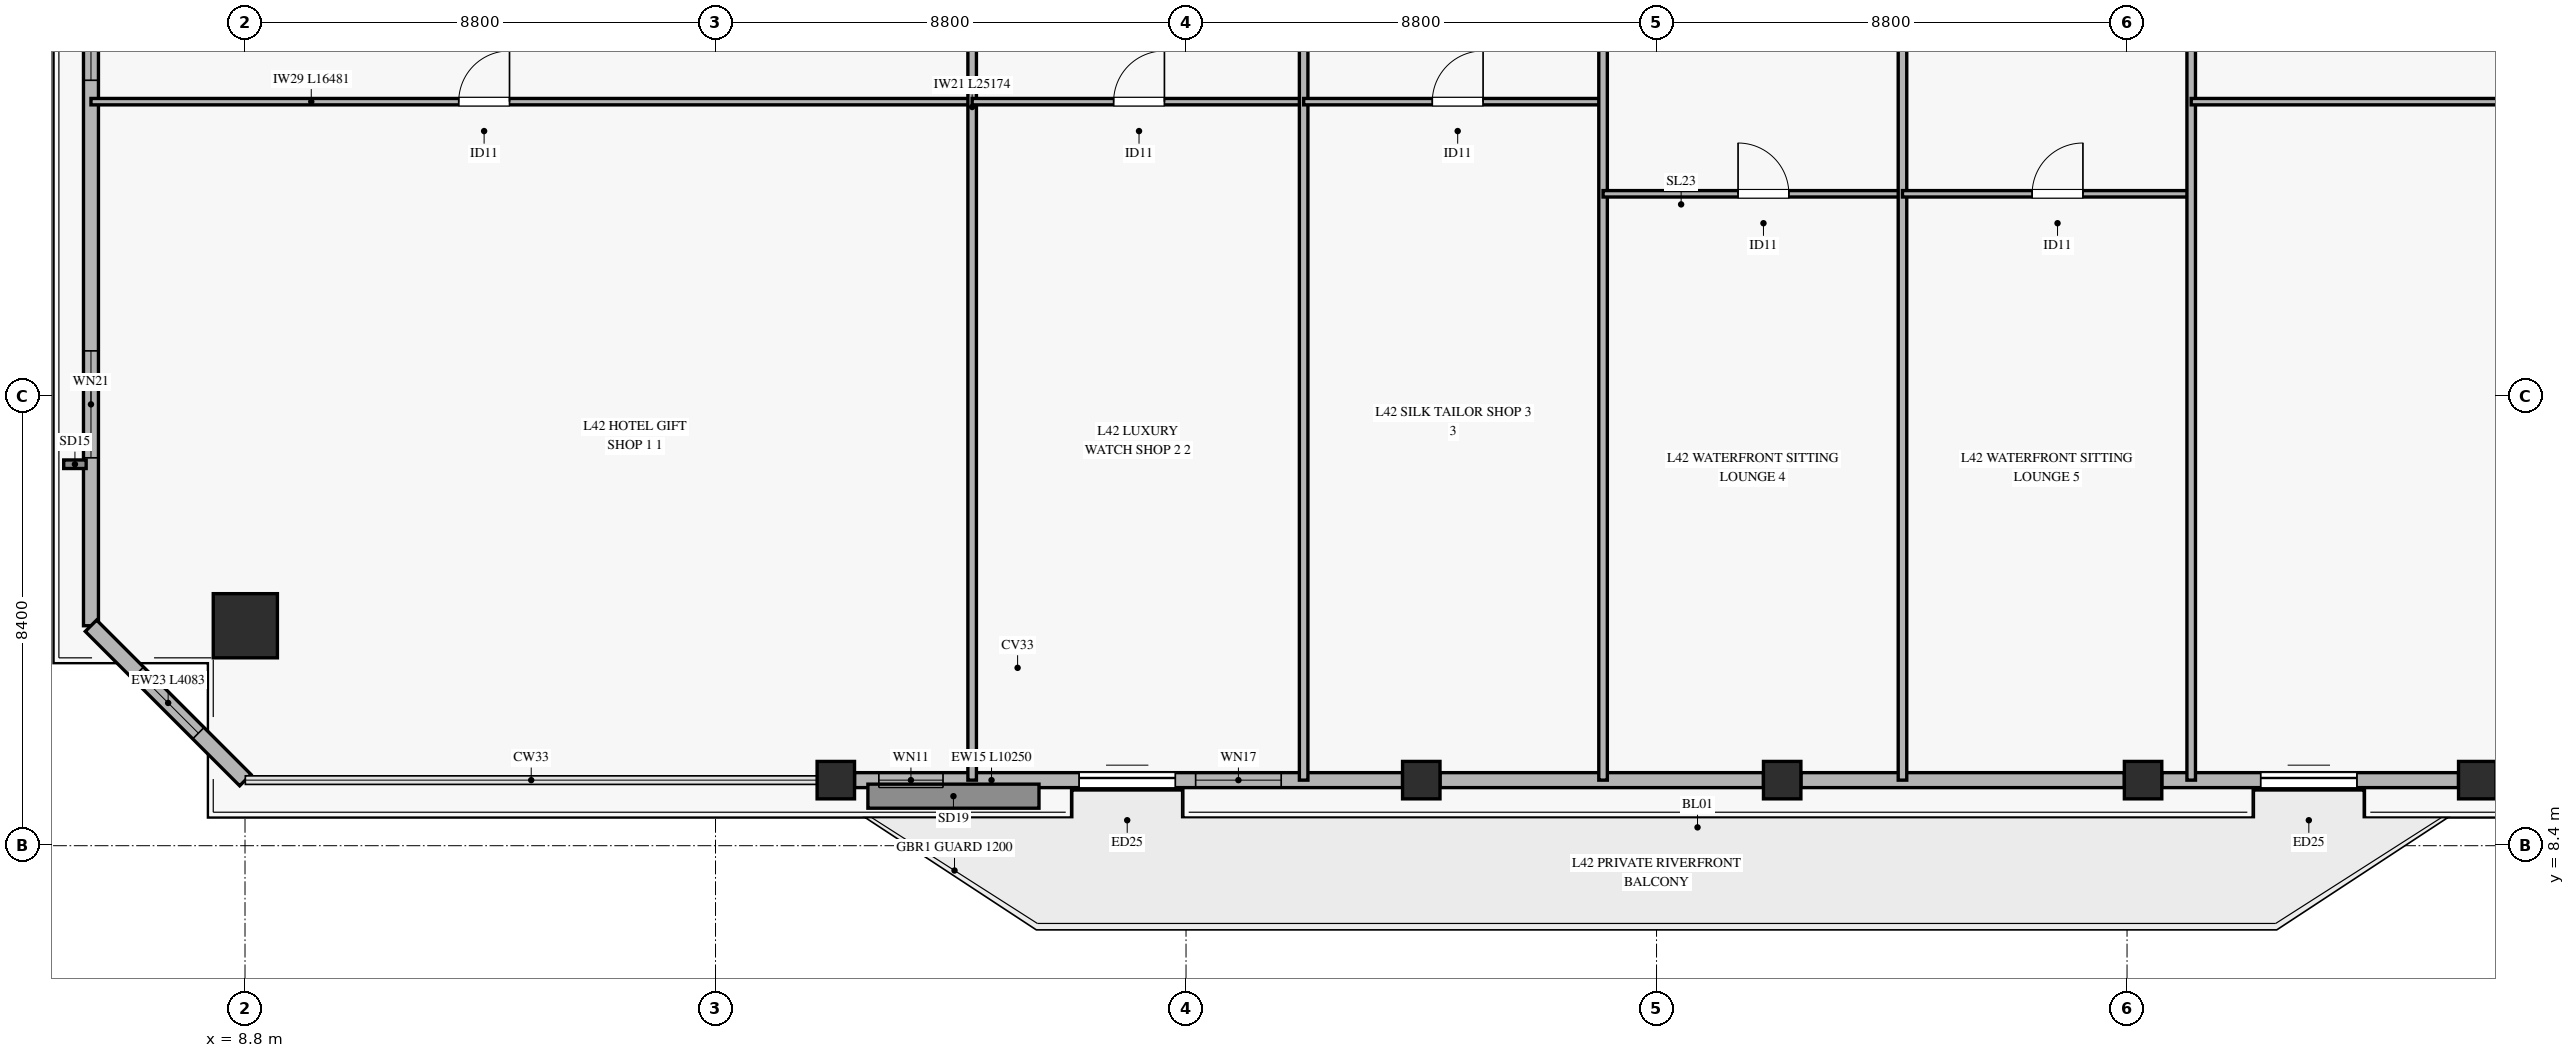
"""IFC4 building model, lengths in metres.
Left out: names, types, materials, properties, quantities, classifications, styles, units other than length and angle.
Written with IfcOpenShell. Run it as: python <this file> out.ifc"""

import sys

from ifc_helpers import new_model, si_unit, direction, frame, frame_2d, origin, origin_2d, place, context, subcontext, project, spatial, rectangle, hollow_rectangle, extrude, source, transform, mapped, element, fill, save


model = new_model("IFC4")
c1 = context("Model", 3, precision=1e-05, world=origin(), true_north=direction((0.0, 1.0)))
c2 = subcontext(c1, "Body", "Model", "MODEL_VIEW")
j1 = project(units=[si_unit("LENGTHUNIT", "METRE"), si_unit("PLANEANGLEUNIT", "RADIAN")], contexts=[c1])
p1 = place(None, origin())
s1 = spatial("IfcSite", under=j1, at=p1, CompositionType="ELEMENT")
p2 = place(p1, origin())
s2 = spatial("IfcBuilding", under=s1, at=p2, CompositionType="ELEMENT")
p3 = place(p2, frame((0.0, 0.0, 170.2)))
s3 = spatial("IfcBuildingStorey", under=s2, at=p3, CompositionType="ELEMENT", Elevation=170.2)
m1 = source(origin(), c2, "Body", "SweptSolid", [
    extrude(hollow_rectangle(XDim=1.2, YDim=1.2, WallThickness=0.055, at=origin_2d()), origin(), (0.0, 0.0, 1.0), 3.27),
])
p4 = place(p3, frame((8.806, 12.513, 0.0), z_axis=(0.0, 0.0, 1.0), x_axis=(1.0, 0.0, 0.0)))
e1 = element("IfcColumn", 1, at=p4, inside=s3, PredefinedType="COLUMN", context=c2, shape_type="MappedRepresentation", body=[
    mapped(m1, transform((0.0, 0.0, 0.0), x_axis=(1.0, 0.0, 0.0), y_axis=(0.0, 1.0, 0.0), z_axis=(0.0, 0.0, 1.0), scale=1.0)),
])
m2 = source(origin(), c2, "Body", "SweptSolid", [
    extrude(hollow_rectangle(XDim=0.7, YDim=0.7, WallThickness=0.032, at=origin_2d()), origin(), (0.0, 0.0, 1.0), 3.27),
])
for number, where, z_axis, x_axis in (
    (2, (19.85, 9.626, 0.0), (0.0, 0.0, 1.0), (1.0, 0.0, 0.0)),
    (3, (30.8, 9.626, 0.0), (0.0, 0.0, 1.0), (1.0, 0.0, 0.0)),
    (4, (37.55, 9.626, 0.0), (0.0, 0.0, 1.0), (1.0, 0.0, 0.0)),
    (5, (44.3, 9.626, 0.0), (0.0, 0.0, 1.0), (1.0, 0.0, 0.0)),
    (6, (50.55, 9.626, 0.0), (0.0, 0.0, 1.0), (1.0, 0.0, 0.0)),
):
    element("IfcColumn", number, at=place(p3, frame(where, z_axis=z_axis, x_axis=x_axis)), inside=s3, PredefinedType="COLUMN", context=c2, shape_type="MappedRepresentation", body=[
        mapped(m2, transform((0.0, 0.0, 0.0), x_axis=(1.0, 0.0, 0.0), y_axis=(0.0, 1.0, 0.0), z_axis=(0.0, 0.0, 1.0), scale=1.0)),
    ])
p5 = place(p3, frame((20.2, 9.626, 0.0), z_axis=(0.0, 0.0, 1.0), x_axis=(1.0, 0.0, 0.0)))
e7 = element("IfcWall", 7, at=p5, inside=s3, PredefinedType="SOLIDWALL", context=c2, shape_type="SweptSolid", body=[
    extrude(rectangle(XDim=10.25, YDim=0.28, at=frame_2d((5.125, 0.0))), origin(), (0.0, 0.0, 1.0), 2.75),
])
p6 = place(p5, frame((4.2, 0.0, 0.0)))
e8 = element("IfcOpeningElement", 8, at=p6, cuts=e7, PredefinedType="OPENING", context=c2, shape_type="SweptSolid", body=[
    extrude(rectangle(XDim=1.8, YDim=2.25, at=frame_2d((0.9, 1.125))), frame((0.0, 0.15, 0.0), z_axis=(0.0, -1.0, 0.0), x_axis=(1.0, 0.0, 0.0)), (0.0, 0.0, 1.0), 0.3),
])
p7 = place(p5, frame((0.455, 0.0, 0.45)))
e9 = element("IfcOpeningElement", 9, at=p7, cuts=e7, PredefinedType="OPENING", context=c2, shape_type="SweptSolid", body=[
    extrude(rectangle(XDim=1.2, YDim=2.0, at=frame_2d((0.6, 1.0))), frame((0.0, 0.15, 0.0), z_axis=(0.0, -1.0, 0.0), x_axis=(1.0, 0.0, 0.0)), (0.0, 0.0, 1.0), 0.3),
])
p8 = place(p5, frame((6.38, 0.0, 0.45)))
e10 = element("IfcOpeningElement", 10, at=p8, cuts=e7, PredefinedType="OPENING", context=c2, shape_type="SweptSolid", body=[
    extrude(rectangle(XDim=1.6, YDim=2.0, at=frame_2d((0.8, 1.0))), frame((0.0, 0.15, 0.0), z_axis=(0.0, -1.0, 0.0), x_axis=(1.0, 0.0, 0.0)), (0.0, 0.0, 1.0), 0.3),
])
for number, where, z_axis, x_axis in (
    (11, (31.15, 9.626, 0.0), (0.0, 0.0, 1.0), (1.0, 0.0, 0.0)),
    (12, (37.9, 9.626, 0.0), (0.0, 0.0, 1.0), (1.0, 0.0, 0.0)),
):
    element("IfcWall", number, at=place(p3, frame(where, z_axis=z_axis, x_axis=x_axis)), inside=s3, PredefinedType="SOLIDWALL", context=c2, shape_type="SweptSolid", body=[
        extrude(rectangle(XDim=6.05, YDim=0.28, at=frame_2d((3.025, 0.0))), origin(), (0.0, 0.0, 1.0), 2.75),
    ])
p9 = place(p3, frame((44.65, 9.626, 0.0), z_axis=(0.0, 0.0, 1.0), x_axis=(1.0, 0.0, 0.0)))
e13 = element("IfcWall", 13, at=p9, inside=s3, PredefinedType="SOLIDWALL", context=c2, shape_type="SweptSolid", body=[
    extrude(rectangle(XDim=5.55, YDim=0.28, at=frame_2d((2.775, 0.0))), origin(), (0.0, 0.0, 1.0), 2.75),
])
p10 = place(p9, frame((1.85, 0.0, 0.0)))
e14 = element("IfcOpeningElement", 14, at=p10, cuts=e13, PredefinedType="OPENING", context=c2, shape_type="SweptSolid", body=[
    extrude(rectangle(XDim=1.8, YDim=2.25, at=frame_2d((0.9, 1.125))), frame((0.0, 0.15, 0.0), z_axis=(0.0, -1.0, 0.0), x_axis=(1.0, 0.0, 0.0)), (0.0, 0.0, 1.0), 0.3),
])
p11 = place(p3, frame((5.919, 12.513, 0.0), z_axis=(0.0, 0.0, 1.0), x_axis=(0.0, 1.0, 0.0)))
e15 = element("IfcWall", 15, at=p11, inside=s3, PredefinedType="SOLIDWALL", context=c2, shape_type="SweptSolid", body=[
    extrude(rectangle(XDim=15.0, YDim=0.28, at=frame_2d((7.5, 0.0))), origin(), (0.0, 0.0, 1.0), 2.75),
])
p12 = place(p11, frame((3.14, 0.0, 0.45)))
e16 = element("IfcOpeningElement", 16, at=p12, cuts=e15, PredefinedType="OPENING", context=c2, shape_type="SweptSolid", body=[
    extrude(rectangle(XDim=2.0, YDim=2.0, at=frame_2d((1.0, 1.0))), frame((0.0, 0.15, 0.0), z_axis=(0.0, -1.0, 0.0), x_axis=(1.0, 0.0, 0.0)), (0.0, 0.0, 1.0), 0.3),
])
p13 = place(p11, frame((10.2, 0.0, 0.45)))
e17 = element("IfcOpeningElement", 17, at=p13, cuts=e15, PredefinedType="OPENING", context=c2, shape_type="SweptSolid", body=[
    extrude(rectangle(XDim=2.0, YDim=2.0, at=frame_2d((1.0, 1.0))), frame((0.0, 0.15, 0.0), z_axis=(0.0, -1.0, 0.0), x_axis=(1.0, 0.0, 0.0)), (0.0, 0.0, 1.0), 0.3),
])
p14 = place(p3, frame((5.919, 12.513, 0.0), z_axis=(0.0, 0.0, 1.0), x_axis=(0.707106781187, -0.707106781187, 0.0)))
e18 = element("IfcWall", 18, at=p14, inside=s3, PredefinedType="SOLIDWALL", context=c2, shape_type="SweptSolid", body=[
    extrude(rectangle(XDim=4.083, YDim=0.3, at=frame_2d((2.042, 0.0))), origin(), (0.0, 0.0, 1.0), 2.75),
])
p15 = place(p14, frame((1.241, 0.0, 0.45)))
e19 = element("IfcOpeningElement", 19, at=p15, cuts=e18, PredefinedType="OPENING", context=c2, shape_type="SweptSolid", body=[
    extrude(rectangle(XDim=1.6, YDim=2.0, at=frame_2d((0.8, 1.0))), frame((0.0, 0.16, 0.0), z_axis=(0.0, -1.0, 0.0), x_axis=(1.0, 0.0, 0.0)), (0.0, 0.0, 1.0), 0.32),
])
p16 = place(p3, frame((5.919, 22.313, 0.0), z_axis=(0.0, 0.0, 1.0), x_axis=(1.0, 0.0, 0.0)))
e20 = element("IfcWall", 20, at=p16, inside=s3, PredefinedType="PARTITIONING", context=c2, shape_type="SweptSolid", body=[
    extrude(rectangle(XDim=16.481, YDim=0.12, at=frame_2d((8.24, 0.0))), origin(), (0.0, 0.0, 1.0), 2.455),
])
p17 = place(p16, frame((6.878, 0.0, 0.0)))
e21 = element("IfcOpeningElement", 21, at=p17, cuts=e20, PredefinedType="OPENING", context=c2, shape_type="SweptSolid", body=[
    extrude(rectangle(XDim=0.95, YDim=2.1, at=frame_2d((0.475, 1.05))), frame((0.0, 0.07, 0.0), z_axis=(0.0, -1.0, 0.0), x_axis=(1.0, 0.0, 0.0)), (0.0, 0.0, 1.0), 0.14),
])
p18 = place(p3, frame((22.4, 9.626, 0.0), z_axis=(0.0, 0.0, 1.0), x_axis=(0.0, 1.0, 0.0)))
e22 = element("IfcWall", 22, at=p18, inside=s3, PredefinedType="PARTITIONING", context=c2, shape_type="SweptSolid", body=[
    extrude(rectangle(XDim=25.174, YDim=0.16, at=frame_2d((12.587, 0.0))), origin(), (0.0, 0.0, 1.0), 2.755),
])
p19 = place(p3, frame((22.4, 22.313, 0.0), z_axis=(0.0, 0.0, 1.0), x_axis=(1.0, 0.0, 0.0)))
e23 = element("IfcWall", 23, at=p19, inside=s3, PredefinedType="PARTITIONING", context=c2, shape_type="SweptSolid", body=[
    extrude(rectangle(XDim=6.2, YDim=0.12, at=frame_2d((3.1, 0.0))), origin(), (0.0, 0.0, 1.0), 3.27),
])
p20 = place(p19, frame((2.646, 0.0, 0.0)))
e24 = element("IfcOpeningElement", 24, at=p20, cuts=e23, PredefinedType="OPENING", context=c2, shape_type="SweptSolid", body=[
    extrude(rectangle(XDim=0.95, YDim=2.1, at=frame_2d((0.475, 1.05))), frame((0.0, 0.07, 0.0), z_axis=(0.0, -1.0, 0.0), x_axis=(1.0, 0.0, 0.0)), (0.0, 0.0, 1.0), 0.14),
])
p21 = place(p3, frame((28.6, 9.626, 0.0), z_axis=(0.0, 0.0, 1.0), x_axis=(0.0, 1.0, 0.0)))
e25 = element("IfcWall", 25, at=p21, inside=s3, PredefinedType="PARTITIONING", context=c2, shape_type="SweptSolid", body=[
    extrude(rectangle(XDim=25.174, YDim=0.16, at=frame_2d((12.587, 0.0))), origin(), (0.0, 0.0, 1.0), 2.755),
])
p22 = place(p3, frame((28.6, 22.313, 0.0), z_axis=(0.0, 0.0, 1.0), x_axis=(1.0, 0.0, 0.0)))
e26 = element("IfcWall", 26, at=p22, inside=s3, PredefinedType="PARTITIONING", context=c2, shape_type="SweptSolid", body=[
    extrude(rectangle(XDim=5.6, YDim=0.12, at=frame_2d((2.8, 0.0))), origin(), (0.0, 0.0, 1.0), 2.455),
])
p23 = place(p22, frame((2.406, 0.0, 0.0)))
e27 = element("IfcOpeningElement", 27, at=p23, cuts=e26, PredefinedType="OPENING", context=c2, shape_type="SweptSolid", body=[
    extrude(rectangle(XDim=0.95, YDim=2.1, at=frame_2d((0.475, 1.05))), frame((0.0, 0.07, 0.0), z_axis=(0.0, -1.0, 0.0), x_axis=(1.0, 0.0, 0.0)), (0.0, 0.0, 1.0), 0.14),
])
p24 = place(p3, frame((34.2, 9.626, 0.0), z_axis=(0.0, 0.0, 1.0), x_axis=(0.0, 1.0, 0.0)))
e28 = element("IfcWall", 28, at=p24, inside=s3, PredefinedType="PARTITIONING", context=c2, shape_type="SweptSolid", body=[
    extrude(rectangle(XDim=25.174, YDim=0.16, at=frame_2d((12.587, 0.0))), origin(), (0.0, 0.0, 1.0), 2.755),
])
p25 = place(p3, frame((34.2, 20.59, 0.0), z_axis=(0.0, 0.0, 1.0), x_axis=(1.0, 0.0, 0.0)))
e29 = element("IfcWall", 29, at=p25, inside=s3, PredefinedType="PARTITIONING", context=c2, shape_type="SweptSolid", body=[
    extrude(rectangle(XDim=5.6, YDim=0.12, at=frame_2d((2.8, 0.0))), origin(), (0.0, 0.0, 1.0), 2.455),
])
p26 = place(p25, frame((2.525, 0.0, 0.0)))
e30 = element("IfcOpeningElement", 30, at=p26, cuts=e29, PredefinedType="OPENING", context=c2, shape_type="SweptSolid", body=[
    extrude(rectangle(XDim=0.95, YDim=2.1, at=frame_2d((0.475, 1.05))), frame((0.0, 0.07, 0.0), z_axis=(0.0, -1.0, 0.0), x_axis=(1.0, 0.0, 0.0)), (0.0, 0.0, 1.0), 0.14),
])
p27 = place(p3, frame((39.8, 9.626, 0.0), z_axis=(0.0, 0.0, 1.0), x_axis=(0.0, 1.0, 0.0)))
e31 = element("IfcWall", 31, at=p27, inside=s3, PredefinedType="PARTITIONING", context=c2, shape_type="SweptSolid", body=[
    extrude(rectangle(XDim=25.174, YDim=0.16, at=frame_2d((12.587, 0.0))), origin(), (0.0, 0.0, 1.0), 2.755),
])
p28 = place(p3, frame((39.8, 20.59, 0.0), z_axis=(0.0, 0.0, 1.0), x_axis=(1.0, 0.0, 0.0)))
e32 = element("IfcWall", 32, at=p28, inside=s3, PredefinedType="PARTITIONING", context=c2, shape_type="SweptSolid", body=[
    extrude(rectangle(XDim=5.4, YDim=0.12, at=frame_2d((2.7, 0.0))), origin(), (0.0, 0.0, 1.0), 2.455),
])
p29 = place(p28, frame((2.425, 0.0, 0.0)))
e33 = element("IfcOpeningElement", 33, at=p29, cuts=e32, PredefinedType="OPENING", context=c2, shape_type="SweptSolid", body=[
    extrude(rectangle(XDim=0.95, YDim=2.1, at=frame_2d((0.475, 1.05))), frame((0.0, 0.07, 0.0), z_axis=(0.0, -1.0, 0.0), x_axis=(1.0, 0.0, 0.0)), (0.0, 0.0, 1.0), 0.14),
])
p30 = place(p3, frame((45.2, 9.626, 0.0), z_axis=(0.0, 0.0, 1.0), x_axis=(0.0, 1.0, 0.0)))
e34 = element("IfcWall", 34, at=p30, inside=s3, PredefinedType="PARTITIONING", context=c2, shape_type="SweptSolid", body=[
    extrude(rectangle(XDim=25.174, YDim=0.16, at=frame_2d((12.587, 0.0))), origin(), (0.0, 0.0, 1.0), 2.755),
])
p31 = place(p3, frame((45.2, 22.313, 0.0), z_axis=(0.0, 0.0, 1.0), x_axis=(1.0, 0.0, 0.0)))
e35 = element("IfcWall", 35, at=p31, inside=s3, PredefinedType="PARTITIONING", context=c2, shape_type="SweptSolid", body=[
    extrude(rectangle(XDim=19.281, YDim=0.12, at=frame_2d((9.641, 0.0))), origin(), (0.0, 0.0, 1.0), 2.455),
])
p32 = place(p31, frame((7.798, 0.0, 0.0)))
e36 = element("IfcOpeningElement", 36, at=p32, cuts=e35, PredefinedType="OPENING", context=c2, shape_type="SweptSolid", body=[
    extrude(rectangle(XDim=0.95, YDim=2.1, at=frame_2d((0.475, 1.05))), frame((0.0, 0.07, 0.0), z_axis=(0.0, -1.0, 0.0), x_axis=(1.0, 0.0, 0.0)), (0.0, 0.0, 1.0), 0.14),
])
m3 = source(origin(), c2, "Body", "SweptSolid", [
    extrude(rectangle(XDim=1.8, YDim=2.25, at=frame_2d((0.9, 1.125))), frame((0.0, 0.025, 0.0), z_axis=(0.0, -1.0, 0.0), x_axis=(1.0, 0.0, 0.0)), (0.0, 0.0, 1.0), 0.05),
])
p33 = place(p6, origin())
e37 = element("IfcDoor", 37, at=p33, inside=s3, OperationType="SLIDING_TO_LEFT", PredefinedType="DOOR", context=c2, shape_type="MappedRepresentation", body=[
    mapped(m3, transform((0.0, 0.0, 0.0), x_axis=(1.0, 0.0, 0.0), y_axis=(0.0, 1.0, 0.0), z_axis=(0.0, 0.0, 1.0), scale=1.0)),
])
fill(e8, e37)
m4 = source(origin(), c2, "Body", "SweptSolid", [
    extrude(rectangle(XDim=1.2, YDim=2.0, at=frame_2d((0.6, 1.0))), frame((0.0, 0.03, 0.0), z_axis=(0.0, -1.0, 0.0), x_axis=(1.0, 0.0, 0.0)), (0.0, 0.0, 1.0), 0.06),
])
p34 = place(p7, origin())
e38 = element("IfcWindow", 38, at=p34, inside=s3, PartitioningType="SINGLE_PANEL", PredefinedType="WINDOW", context=c2, shape_type="MappedRepresentation", body=[
    mapped(m4, transform((0.0, 0.0, 0.0), x_axis=(1.0, 0.0, 0.0), y_axis=(0.0, 1.0, 0.0), z_axis=(0.0, 0.0, 1.0), scale=1.0)),
])
fill(e9, e38)
m5 = source(origin(), c2, "Body", "SweptSolid", [
    extrude(rectangle(XDim=1.6, YDim=2.0, at=frame_2d((0.8, 1.0))), frame((0.0, 0.03, 0.0), z_axis=(0.0, -1.0, 0.0), x_axis=(1.0, 0.0, 0.0)), (0.0, 0.0, 1.0), 0.06),
])
p35 = place(p8, origin())
e39 = element("IfcWindow", 39, at=p35, inside=s3, PartitioningType="SINGLE_PANEL", PredefinedType="WINDOW", context=c2, shape_type="MappedRepresentation", body=[
    mapped(m5, transform((0.0, 0.0, 0.0), x_axis=(1.0, 0.0, 0.0), y_axis=(0.0, 1.0, 0.0), z_axis=(0.0, 0.0, 1.0), scale=1.0)),
])
fill(e10, e39)
p36 = place(p10, origin())
e40 = element("IfcDoor", 40, at=p36, inside=s3, OperationType="SLIDING_TO_LEFT", PredefinedType="DOOR", context=c2, shape_type="MappedRepresentation", body=[
    mapped(m3, transform((0.0, 0.0, 0.0), x_axis=(1.0, 0.0, 0.0), y_axis=(0.0, 1.0, 0.0), z_axis=(0.0, 0.0, 1.0), scale=1.0)),
])
fill(e14, e40)
m6 = source(origin(), c2, "Body", "SweptSolid", [
    extrude(rectangle(XDim=2.0, YDim=2.0, at=frame_2d((1.0, 1.0))), frame((0.0, 0.03, 0.0), z_axis=(0.0, -1.0, 0.0), x_axis=(1.0, 0.0, 0.0)), (0.0, 0.0, 1.0), 0.06),
])
p37 = place(p12, origin())
e41 = element("IfcWindow", 41, at=p37, inside=s3, PartitioningType="SINGLE_PANEL", PredefinedType="WINDOW", context=c2, shape_type="MappedRepresentation", body=[
    mapped(m6, transform((0.0, 0.0, 0.0), x_axis=(1.0, 0.0, 0.0), y_axis=(0.0, 1.0, 0.0), z_axis=(0.0, 0.0, 1.0), scale=1.0)),
])
fill(e16, e41)
p38 = place(p13, origin())
e42 = element("IfcWindow", 42, at=p38, inside=s3, PartitioningType="SINGLE_PANEL", PredefinedType="WINDOW", context=c2, shape_type="MappedRepresentation", body=[
    mapped(m6, transform((0.0, 0.0, 0.0), x_axis=(1.0, 0.0, 0.0), y_axis=(0.0, 1.0, 0.0), z_axis=(0.0, 0.0, 1.0), scale=1.0)),
])
fill(e17, e42)
p39 = place(p15, origin())
e43 = element("IfcWindow", 43, at=p39, inside=s3, PartitioningType="SINGLE_PANEL", PredefinedType="WINDOW", context=c2, shape_type="MappedRepresentation", body=[
    mapped(m5, transform((0.0, 0.0, 0.0), x_axis=(1.0, 0.0, 0.0), y_axis=(0.0, 1.0, 0.0), z_axis=(0.0, 0.0, 1.0), scale=1.0)),
])
fill(e19, e43)
m7 = source(origin(), c2, "Body", "SweptSolid", [
    extrude(rectangle(XDim=0.95, YDim=2.1, at=frame_2d((0.475, 1.05))), frame((0.0, 0.025, 0.0), z_axis=(0.0, -1.0, 0.0), x_axis=(1.0, 0.0, 0.0)), (0.0, 0.0, 1.0), 0.05),
])
p40 = place(p17, origin())
e44 = element("IfcDoor", 44, at=p40, inside=s3, OperationType="SINGLE_SWING_RIGHT", PredefinedType="DOOR", context=c2, shape_type="MappedRepresentation", body=[
    mapped(m7, transform((0.0, 0.0, 0.0), x_axis=(1.0, 0.0, 0.0), y_axis=(0.0, 1.0, 0.0), z_axis=(0.0, 0.0, 1.0), scale=1.0)),
])
fill(e21, e44)
p41 = place(p20, origin())
e45 = element("IfcDoor", 45, at=p41, inside=s3, OperationType="SINGLE_SWING_RIGHT", PredefinedType="DOOR", context=c2, shape_type="MappedRepresentation", body=[
    mapped(m7, transform((0.0, 0.0, 0.0), x_axis=(1.0, 0.0, 0.0), y_axis=(0.0, 1.0, 0.0), z_axis=(0.0, 0.0, 1.0), scale=1.0)),
])
fill(e24, e45)
p42 = place(p23, origin())
e46 = element("IfcDoor", 46, at=p42, inside=s3, OperationType="SINGLE_SWING_RIGHT", PredefinedType="DOOR", context=c2, shape_type="MappedRepresentation", body=[
    mapped(m7, transform((0.0, 0.0, 0.0), x_axis=(1.0, 0.0, 0.0), y_axis=(0.0, 1.0, 0.0), z_axis=(0.0, 0.0, 1.0), scale=1.0)),
])
fill(e27, e46)
p43 = place(p26, origin())
e47 = element("IfcDoor", 47, at=p43, inside=s3, OperationType="SINGLE_SWING_LEFT", PredefinedType="DOOR", context=c2, shape_type="MappedRepresentation", body=[
    mapped(m7, transform((0.0, 0.0, 0.0), x_axis=(1.0, 0.0, 0.0), y_axis=(0.0, 1.0, 0.0), z_axis=(0.0, 0.0, 1.0), scale=1.0)),
])
fill(e30, e47)
p44 = place(p29, origin())
e48 = element("IfcDoor", 48, at=p44, inside=s3, OperationType="SINGLE_SWING_RIGHT", PredefinedType="DOOR", context=c2, shape_type="MappedRepresentation", body=[
    mapped(m7, transform((0.0, 0.0, 0.0), x_axis=(1.0, 0.0, 0.0), y_axis=(0.0, 1.0, 0.0), z_axis=(0.0, 0.0, 1.0), scale=1.0)),
])
fill(e33, e48)
save(model, sys.argv[1])
